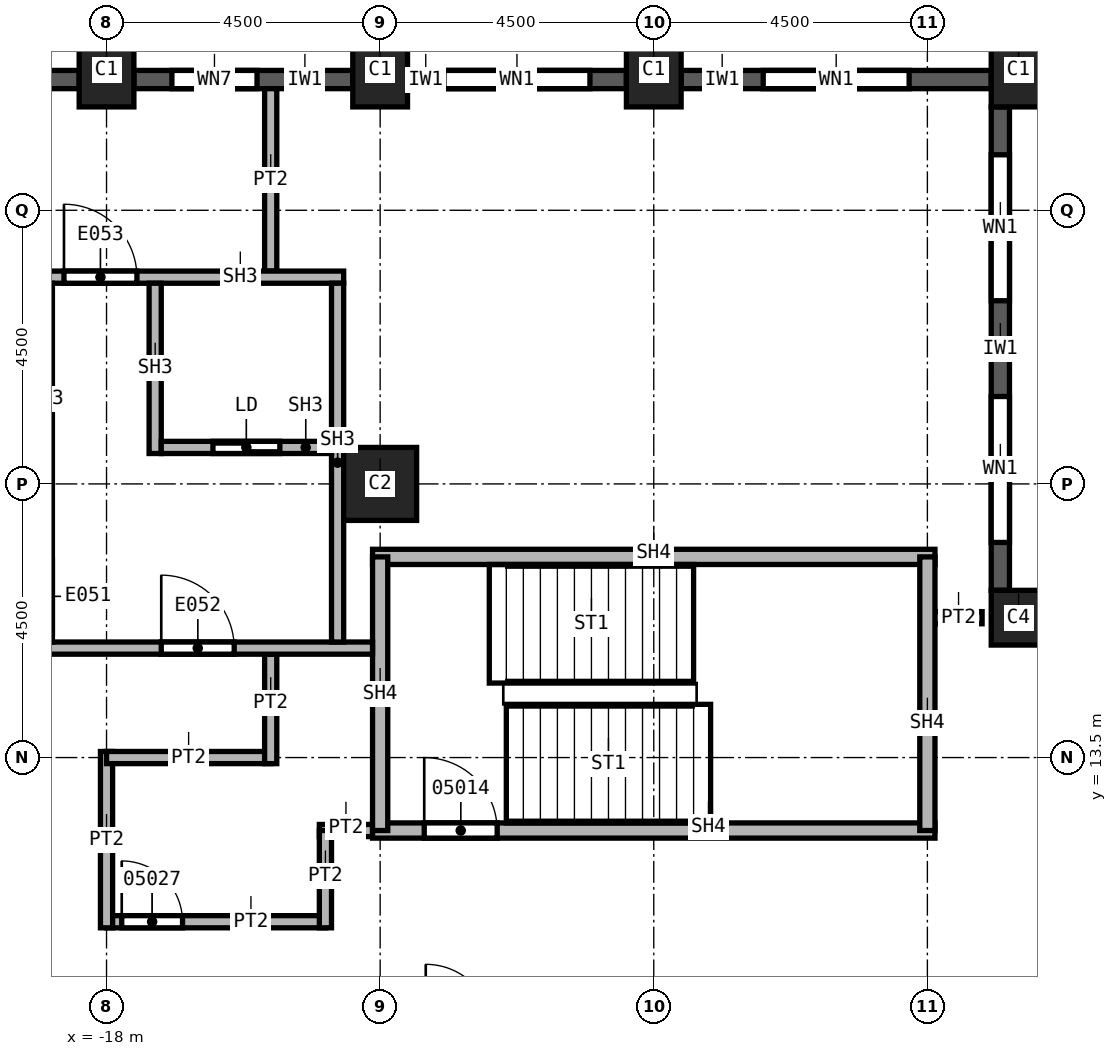
"""IFC4 building model, lengths in metres.
Left out: names, types, materials, properties, quantities, classifications, styles, units other than length and angle.
Written with IfcOpenShell. Run it as: python <this file> out.ifc"""

import sys

from ifc_helpers import new_model, si_unit, direction, frame, frame_2d, origin, origin_2d, place, context, subcontext, project, spatial, rectangle, extrude, element, fill, save


model = new_model("IFC4")
c1 = context("Model", 3, precision=1e-05, world=origin(), true_north=direction((0.0, 1.0)))
c2 = subcontext(c1, "Body", "Model", "MODEL_VIEW")
j1 = project(units=[si_unit("LENGTHUNIT", "METRE"), si_unit("PLANEANGLEUNIT", "RADIAN")], contexts=[c1])
p1 = place(None, origin())
s1 = spatial("IfcSite", under=j1, at=p1, CompositionType="ELEMENT")
p2 = place(p1, origin())
s2 = spatial("IfcBuilding", under=s1, at=p2, CompositionType="ELEMENT")
p3 = place(p2, frame((0.0, 0.0, 116.0)))
s3 = spatial("IfcBuildingStorey", under=s2, at=p3, CompositionType="ELEMENT", Elevation=116.0)
p4 = place(p3, frame((-13.5, 18.0, 0.0), z_axis=(0.0, 0.0, 1.0), x_axis=(1.0, 0.0, 0.0)))
e1 = element("IfcColumn", 1, at=p4, inside=s3, PredefinedType="COLUMN", context=c2, shape_type="SweptSolid", body=[
    extrude(rectangle(XDim=1.2, YDim=1.2, at=origin_2d()), origin(), (0.0, 0.0, 1.0), 3.6),
])
for number, where, z_axis, x_axis in (
    (2, (-3.0, 24.8, 0.0), (0.0, 0.0, 1.0), (1.0, 0.0, 0.0)),
    (3, (-9.0, 24.8, 0.0), (0.0, 0.0, 1.0), (1.0, 0.0, 0.0)),
    (4, (-13.5, 24.8, 0.0), (0.0, 0.0, 1.0), (1.0, 0.0, 0.0)),
    (5, (-18.0, 24.8, 0.0), (0.0, 0.0, 1.0), (1.0, 0.0, 0.0)),
):
    element("IfcColumn", number, at=place(p3, frame(where, z_axis=z_axis, x_axis=x_axis)), inside=s3, PredefinedType="COLUMN", context=c2, shape_type="SweptSolid", body=[
        extrude(rectangle(XDim=0.9, YDim=1.2, at=origin_2d()), origin(), (0.0, 0.0, 1.0), 3.6),
    ])
p5 = place(p3, frame((-3.0, 15.8, 0.0), z_axis=(0.0, 0.0, 1.0), x_axis=(1.0, 0.0, 0.0)))
e6 = element("IfcColumn", 6, at=p5, inside=s3, PredefinedType="COLUMN", context=c2, shape_type="SweptSolid", body=[
    extrude(rectangle(XDim=0.9, YDim=0.9, at=origin_2d()), origin(), (0.0, 0.0, 1.0), 3.6),
])
p6 = place(p3, frame((-3.3, 16.25, 0.0), z_axis=(0.0, 0.0, 1.0), x_axis=(0.0, 1.0, 0.0)))
e7 = element("IfcWall", 7, at=p6, inside=s3, PredefinedType="SOLIDWALL", context=c2, shape_type="SweptSolid", body=[
    extrude(rectangle(XDim=7.95, YDim=0.3, at=frame_2d((3.975, 0.0))), origin(), (0.0, 0.0, 1.0), 3.0),
])
p7 = place(p6, frame((0.788, 0.0, 0.8)))
e8 = element("IfcOpeningElement", 8, at=p7, cuts=e7, PredefinedType="OPENING", context=c2, shape_type="SweptSolid", body=[
    extrude(rectangle(XDim=2.4, YDim=1.95, at=frame_2d((1.2, 0.975))), frame((0.0, 0.15, 0.0), z_axis=(0.0, -1.0, 0.0), x_axis=(1.0, 0.0, 0.0)), (0.0, 0.0, 1.0), 0.3),
])
p8 = place(p6, frame((4.762, 0.0, 0.8)))
e9 = element("IfcOpeningElement", 9, at=p8, cuts=e7, PredefinedType="OPENING", context=c2, shape_type="SweptSolid", body=[
    extrude(rectangle(XDim=2.4, YDim=1.95, at=frame_2d((1.2, 0.975))), frame((0.0, 0.15, 0.0), z_axis=(0.0, -1.0, 0.0), x_axis=(1.0, 0.0, 0.0)), (0.0, 0.0, 1.0), 0.3),
])
p9 = place(p3, frame((-3.45, 24.65, 0.0), z_axis=(0.0, 0.0, 1.0), x_axis=(-1.0, 0.0, 0.0)))
e10 = element("IfcWall", 10, at=p9, inside=s3, PredefinedType="SOLIDWALL", context=c2, shape_type="SweptSolid", body=[
    extrude(rectangle(XDim=5.1, YDim=0.3, at=frame_2d((2.55, 0.0))), origin(), (0.0, 0.0, 1.0), 3.0),
])
p10 = place(p9, frame((1.35, 0.0, 0.8)))
e11 = element("IfcOpeningElement", 11, at=p10, cuts=e10, PredefinedType="OPENING", context=c2, shape_type="SweptSolid", body=[
    extrude(rectangle(XDim=2.4, YDim=1.95, at=frame_2d((1.2, 0.975))), frame((0.0, 0.15, 0.0), z_axis=(0.0, -1.0, 0.0), x_axis=(1.0, 0.0, 0.0)), (0.0, 0.0, 1.0), 0.3),
])
p11 = place(p3, frame((-9.45, 24.65, 0.0), z_axis=(0.0, 0.0, 1.0), x_axis=(-1.0, 0.0, 0.0)))
e12 = element("IfcWall", 12, at=p11, inside=s3, PredefinedType="SOLIDWALL", context=c2, shape_type="SweptSolid", body=[
    extrude(rectangle(XDim=3.6, YDim=0.3, at=frame_2d((1.8, 0.0))), origin(), (0.0, 0.0, 1.0), 3.0),
])
p12 = place(p11, frame((0.6, 0.0, 0.8)))
e13 = element("IfcOpeningElement", 13, at=p12, cuts=e12, PredefinedType="OPENING", context=c2, shape_type="SweptSolid", body=[
    extrude(rectangle(XDim=2.4, YDim=1.95, at=frame_2d((1.2, 0.975))), frame((0.0, 0.15, 0.0), z_axis=(0.0, -1.0, 0.0), x_axis=(1.0, 0.0, 0.0)), (0.0, 0.0, 1.0), 0.3),
])
p13 = place(p3, frame((-13.95, 24.65, 0.0), z_axis=(0.0, 0.0, 1.0), x_axis=(-1.0, 0.0, 0.0)))
e14 = element("IfcWall", 14, at=p13, inside=s3, PredefinedType="SOLIDWALL", context=c2, shape_type="SweptSolid", body=[
    extrude(rectangle(XDim=3.6, YDim=0.3, at=frame_2d((1.8, 0.0))), origin(), (0.0, 0.0, 1.0), 3.0),
])
p14 = place(p13, frame((1.575, 0.0, 0.8)))
e15 = element("IfcOpeningElement", 15, at=p14, cuts=e14, PredefinedType="OPENING", context=c2, shape_type="SweptSolid", body=[
    extrude(rectangle(XDim=1.4, YDim=1.95, at=frame_2d((0.7, 0.975))), frame((0.0, 0.15, 0.0), z_axis=(0.0, -1.0, 0.0), x_axis=(1.0, 0.0, 0.0)), (0.0, 0.0, 1.0), 0.3),
])
p15 = place(p3, frame((-18.45, 24.65, 0.0), z_axis=(0.0, 0.0, 1.0), x_axis=(-1.0, 0.0, 0.0)))
e16 = element("IfcWall", 16, at=p15, inside=s3, PredefinedType="SOLIDWALL", context=c2, shape_type="SweptSolid", body=[
    extrude(rectangle(XDim=3.6, YDim=0.3, at=frame_2d((1.8, 0.0))), origin(), (0.0, 0.0, 1.0), 3.0),
])
p16 = place(p15, frame((0.6, 0.0, 0.8)))
e17 = element("IfcOpeningElement", 17, at=p16, cuts=e16, PredefinedType="OPENING", context=c2, shape_type="SweptSolid", body=[
    extrude(rectangle(XDim=2.4, YDim=1.95, at=frame_2d((1.2, 0.975))), frame((0.0, 0.15, 0.0), z_axis=(0.0, -1.0, 0.0), x_axis=(1.0, 0.0, 0.0)), (0.0, 0.0, 1.0), 0.3),
])
p17 = place(p3, frame((-18.0, 10.8, 0.0), z_axis=(0.0, 0.0, 1.0), x_axis=(1.0, 0.0, 0.0)))
e18 = element("IfcWall", 18, at=p17, inside=s3, PredefinedType="PARTITIONING", context=c2, shape_type="SweptSolid", body=[
    extrude(rectangle(XDim=3.6, YDim=0.2, at=frame_2d((1.8, 0.0))), origin(), (0.0, 0.0, 1.0), 3.6),
])
p18 = place(p17, frame((0.25, 0.0, 0.0)))
e19 = element("IfcOpeningElement", 19, at=p18, cuts=e18, PredefinedType="OPENING", context=c2, shape_type="SweptSolid", body=[
    extrude(rectangle(XDim=1.0, YDim=2.1, at=frame_2d((0.5, 1.05))), frame((0.0, 0.1, 0.0), z_axis=(0.0, -1.0, 0.0), x_axis=(1.0, 0.0, 0.0)), (0.0, 0.0, 1.0), 0.2),
])
p19 = place(p3, frame((-18.0, 13.6, 0.0), z_axis=(0.0, 0.0, 1.0), x_axis=(0.0, -1.0, 0.0)))
e20 = element("IfcWall", 20, at=p19, inside=s3, PredefinedType="PARTITIONING", context=c2, shape_type="SweptSolid", body=[
    extrude(rectangle(XDim=2.9, YDim=0.2, at=frame_2d((1.45, 0.0))), origin(), (0.0, 0.0, 1.0), 3.6),
])
p20 = place(p3, frame((-15.3, 13.5, 0.0), z_axis=(0.0, 0.0, 1.0), x_axis=(-1.0, 0.0, 0.0)))
e21 = element("IfcWall", 21, at=p20, inside=s3, PredefinedType="PARTITIONING", context=c2, shape_type="SweptSolid", body=[
    extrude(rectangle(XDim=2.7, YDim=0.2, at=frame_2d((1.35, 0.0))), origin(), (0.0, 0.0, 1.0), 3.6),
])
p21 = place(p3, frame((-15.3, 15.2, 0.0), z_axis=(0.0, 0.0, 1.0), x_axis=(0.0, -1.0, 0.0)))
e22 = element("IfcWall", 22, at=p21, inside=s3, PredefinedType="PARTITIONING", context=c2, shape_type="SweptSolid", body=[
    extrude(rectangle(XDim=1.8, YDim=0.2, at=frame_2d((0.9, 0.0))), origin(), (0.0, 0.0, 1.0), 3.6),
])
p22 = place(p3, frame((-15.3, 24.5, 0.0), z_axis=(0.0, 0.0, 1.0), x_axis=(0.0, -1.0, 0.0)))
e23 = element("IfcWall", 23, at=p22, inside=s3, PredefinedType="PARTITIONING", context=c2, shape_type="SweptSolid", body=[
    extrude(rectangle(XDim=3.0, YDim=0.2, at=frame_2d((1.5, 0.0))), origin(), (0.0, 0.0, 1.0), 3.6),
])
p23 = place(p3, frame((-14.5, 12.3, 0.0), z_axis=(0.0, 0.0, 1.0), x_axis=(1.0, 0.0, 0.0)))
e24 = element("IfcWall", 24, at=p23, inside=s3, PredefinedType="PARTITIONING", context=c2, shape_type="SweptSolid", body=[
    extrude(rectangle(XDim=1.125, YDim=0.2, at=frame_2d((0.562, 0.0))), origin(), (0.0, 0.0, 1.0), 3.6),
])
p24 = place(p3, frame((-14.4, 10.7, 0.0), z_axis=(0.0, 0.0, 1.0), x_axis=(0.0, 1.0, 0.0)))
e25 = element("IfcWall", 25, at=p24, inside=s3, PredefinedType="PARTITIONING", context=c2, shape_type="SweptSolid", body=[
    extrude(rectangle(XDim=1.6, YDim=0.2, at=frame_2d((0.8, 0.0))), origin(), (0.0, 0.0, 1.0), 3.6),
])
p25 = place(p3, frame((-4.5, 15.8, 0.0), z_axis=(0.0, 0.0, 1.0), x_axis=(1.0, 0.0, 0.0)))
e26 = element("IfcWall", 26, at=p25, inside=s3, PredefinedType="PARTITIONING", context=c2, shape_type="SweptSolid", body=[
    extrude(rectangle(XDim=0.9, YDim=0.2, at=frame_2d((0.45, 0.0))), origin(), (0.0, 0.0, 1.0), 3.6),
])
p26 = place(p3, frame((-13.625, 12.3, 0.0), z_axis=(0.0, 0.0, 1.0), x_axis=(1.0, 0.0, 0.0)))
e27 = element("IfcWall", 27, at=p26, inside=s3, PredefinedType="SOLIDWALL", context=c2, shape_type="SweptSolid", body=[
    extrude(rectangle(XDim=9.25, YDim=0.25, at=frame_2d((4.625, 0.0))), origin(), (0.0, 0.0, 1.0), 3.6),
])
p27 = place(p26, frame((0.85, 0.0, 0.0)))
e28 = element("IfcOpeningElement", 28, at=p27, cuts=e27, PredefinedType="OPENING", context=c2, shape_type="SweptSolid", body=[
    extrude(rectangle(XDim=1.2, YDim=2.1, at=frame_2d((0.6, 1.05))), frame((0.0, 0.125, 0.0), z_axis=(0.0, -1.0, 0.0), x_axis=(1.0, 0.0, 0.0)), (0.0, 0.0, 1.0), 0.25),
])
p28 = place(p3, frame((-13.625, 16.8, 0.0), z_axis=(0.0, 0.0, 1.0), x_axis=(1.0, 0.0, 0.0)))
e29 = element("IfcWall", 29, at=p28, inside=s3, PredefinedType="SOLIDWALL", context=c2, shape_type="SweptSolid", body=[
    extrude(rectangle(XDim=9.25, YDim=0.25, at=frame_2d((4.625, 0.0))), origin(), (0.0, 0.0, 1.0), 3.6),
])
for number, where, z_axis, x_axis in (
    (30, (-13.5, 12.3, 0.0), (0.0, 0.0, 1.0), (0.0, 1.0, 0.0)),
    (31, (-4.5, 16.8, 0.0), (0.0, 0.0, 1.0), (0.0, -1.0, 0.0)),
):
    element("IfcWall", number, at=place(p3, frame(where, z_axis=z_axis, x_axis=x_axis)), inside=s3, PredefinedType="SOLIDWALL", context=c2, shape_type="SweptSolid", body=[
        extrude(rectangle(XDim=4.5, YDim=0.25, at=frame_2d((2.25, 0.0))), origin(), (0.0, 0.0, 1.0), 3.6),
    ])
p29 = place(p3, frame((-21.9, 15.3, 0.0), z_axis=(0.0, 0.0, 1.0), x_axis=(1.0, 0.0, 0.0)))
e32 = element("IfcWall", 32, at=p29, inside=s3, PredefinedType="SOLIDWALL", context=c2, shape_type="SweptSolid", body=[
    extrude(rectangle(XDim=8.275, YDim=0.2, at=frame_2d((4.137, 0.0))), origin(), (0.0, 0.0, 1.0), 3.6),
])
p30 = place(p29, frame((4.8, 0.0, 0.0)))
e33 = element("IfcOpeningElement", 33, at=p30, cuts=e32, PredefinedType="OPENING", context=c2, shape_type="SweptSolid", body=[
    extrude(rectangle(XDim=1.2, YDim=2.1, at=frame_2d((0.6, 1.05))), frame((0.0, 0.1, 0.0), z_axis=(0.0, -1.0, 0.0), x_axis=(1.0, 0.0, 0.0)), (0.0, 0.0, 1.0), 0.2),
])
p31 = place(p3, frame((-21.9, 21.4, 0.0), z_axis=(0.0, 0.0, 1.0), x_axis=(1.0, 0.0, 0.0)))
e34 = element("IfcWall", 34, at=p31, inside=s3, PredefinedType="SOLIDWALL", context=c2, shape_type="SweptSolid", body=[
    extrude(rectangle(XDim=7.8, YDim=0.2, at=frame_2d((3.9, 0.0))), origin(), (0.0, 0.0, 1.0), 3.6),
])
p32 = place(p31, frame((3.2, 0.0, 0.0)))
e35 = element("IfcOpeningElement", 35, at=p32, cuts=e34, PredefinedType="OPENING", context=c2, shape_type="SweptSolid", body=[
    extrude(rectangle(XDim=1.2, YDim=2.1, at=frame_2d((0.6, 1.05))), frame((0.0, 0.1, 0.0), z_axis=(0.0, -1.0, 0.0), x_axis=(1.0, 0.0, 0.0)), (0.0, 0.0, 1.0), 0.2),
])
p33 = place(p3, frame((-14.2, 15.4, 0.0), z_axis=(0.0, 0.0, 1.0), x_axis=(0.0, 1.0, 0.0)))
e36 = element("IfcWall", 36, at=p33, inside=s3, PredefinedType="SOLIDWALL", context=c2, shape_type="SweptSolid", body=[
    extrude(rectangle(XDim=5.9, YDim=0.2, at=frame_2d((2.95, 0.0))), origin(), (0.0, 0.0, 1.0), 3.6),
])
p34 = place(p3, frame((-18.99, 15.4, 0.0), z_axis=(0.0, 0.0, 1.0), x_axis=(0.0, 1.0, 0.0)))
e37 = element("IfcWall", 37, at=p34, inside=s3, PredefinedType="SOLIDWALL", context=c2, shape_type="SweptSolid", body=[
    extrude(rectangle(XDim=5.9, YDim=0.2, at=frame_2d((2.95, 0.0))), origin(), (0.0, 0.0, 1.0), 3.6),
])
p35 = place(p34, frame((0.15, 0.0, 0.0)))
e38 = element("IfcOpeningElement", 38, at=p35, cuts=e37, PredefinedType="OPENING", context=c2, shape_type="SweptSolid", body=[
    extrude(rectangle(XDim=1.2, YDim=2.1, at=frame_2d((0.6, 1.05))), frame((0.0, 0.1, 0.0), z_axis=(0.0, -1.0, 0.0), x_axis=(1.0, 0.0, 0.0)), (0.0, 0.0, 1.0), 0.2),
])
p36 = place(p3, frame((-17.2, 18.5, 0.0), z_axis=(0.0, 0.0, 1.0), x_axis=(0.0, 1.0, 0.0)))
e39 = element("IfcWall", 39, at=p36, inside=s3, PredefinedType="SOLIDWALL", context=c2, shape_type="SweptSolid", body=[
    extrude(rectangle(XDim=2.8, YDim=0.2, at=frame_2d((1.4, 0.0))), origin(), (0.0, 0.0, 1.0), 3.6),
])
p37 = place(p3, frame((-17.1, 18.6, 0.0), z_axis=(0.0, 0.0, 1.0), x_axis=(1.0, 0.0, 0.0)))
e40 = element("IfcWall", 40, at=p37, inside=s3, PredefinedType="SOLIDWALL", context=c2, shape_type="SweptSolid", body=[
    extrude(rectangle(XDim=2.8, YDim=0.2, at=frame_2d((1.4, 0.0))), origin(), (0.0, 0.0, 1.0), 3.6),
])
p38 = place(p37, frame((0.85, 0.0, 0.0)))
e41 = element("IfcOpeningElement", 41, at=p38, cuts=e40, PredefinedType="OPENING", context=c2, shape_type="SweptSolid", body=[
    extrude(rectangle(XDim=1.1, YDim=2.1, at=frame_2d((0.55, 1.05))), frame((0.0, 0.1, 0.0), z_axis=(0.0, -1.0, 0.0), x_axis=(1.0, 0.0, 0.0)), (0.0, 0.0, 1.0), 0.2),
])
p39 = place(p7, origin())
e42 = element("IfcWindow", 42, at=p39, inside=s3, PartitioningType="SINGLE_PANEL", PredefinedType="WINDOW", context=c2, shape_type="SweptSolid", body=[
    extrude(rectangle(XDim=2.4, YDim=1.95, at=frame_2d((1.2, 0.975))), frame((0.0, 0.03, 0.0), z_axis=(0.0, -1.0, 0.0), x_axis=(1.0, 0.0, 0.0)), (0.0, 0.0, 1.0), 0.06),
])
fill(e8, e42)
p40 = place(p8, origin())
e43 = element("IfcWindow", 43, at=p40, inside=s3, PartitioningType="SINGLE_PANEL", PredefinedType="WINDOW", context=c2, shape_type="SweptSolid", body=[
    extrude(rectangle(XDim=2.4, YDim=1.95, at=frame_2d((1.2, 0.975))), frame((0.0, 0.03, 0.0), z_axis=(0.0, -1.0, 0.0), x_axis=(1.0, 0.0, 0.0)), (0.0, 0.0, 1.0), 0.06),
])
fill(e9, e43)
p41 = place(p10, origin())
e44 = element("IfcWindow", 44, at=p41, inside=s3, PartitioningType="SINGLE_PANEL", PredefinedType="WINDOW", context=c2, shape_type="SweptSolid", body=[
    extrude(rectangle(XDim=2.4, YDim=1.95, at=frame_2d((1.2, 0.975))), frame((0.0, 0.03, 0.0), z_axis=(0.0, -1.0, 0.0), x_axis=(1.0, 0.0, 0.0)), (0.0, 0.0, 1.0), 0.06),
])
fill(e11, e44)
p42 = place(p12, origin())
e45 = element("IfcWindow", 45, at=p42, inside=s3, PartitioningType="SINGLE_PANEL", PredefinedType="WINDOW", context=c2, shape_type="SweptSolid", body=[
    extrude(rectangle(XDim=2.4, YDim=1.95, at=frame_2d((1.2, 0.975))), frame((0.0, 0.03, 0.0), z_axis=(0.0, -1.0, 0.0), x_axis=(1.0, 0.0, 0.0)), (0.0, 0.0, 1.0), 0.06),
])
fill(e13, e45)
p43 = place(p27, origin())
e46 = element("IfcDoor", 46, at=p43, inside=s3, OperationType="SINGLE_SWING_LEFT", PredefinedType="DOOR", context=c2, shape_type="SweptSolid", body=[
    extrude(rectangle(XDim=1.2, YDim=2.1, at=frame_2d((0.6, 1.05))), frame((0.0, 0.025, 0.0), z_axis=(0.0, -1.0, 0.0), x_axis=(1.0, 0.0, 0.0)), (0.0, 0.0, 1.0), 0.05),
])
fill(e28, e46)
p44 = place(p18, origin())
e47 = element("IfcDoor", 47, at=p44, inside=s3, OperationType="SINGLE_SWING_RIGHT", PredefinedType="DOOR", context=c2, shape_type="SweptSolid", body=[
    extrude(rectangle(XDim=1.0, YDim=2.1, at=frame_2d((0.5, 1.05))), frame((0.0, 0.025, 0.0), z_axis=(0.0, -1.0, 0.0), x_axis=(1.0, 0.0, 0.0)), (0.0, 0.0, 1.0), 0.05),
])
fill(e19, e47)
p45 = place(p38, origin())
e48 = element("IfcDoor", 48, at=p45, inside=s3, OperationType="SLIDING_TO_LEFT", PredefinedType="DOOR", context=c2, shape_type="SweptSolid", body=[
    extrude(rectangle(XDim=1.1, YDim=2.1, at=frame_2d((0.55, 1.05))), frame((0.0, 0.025, 0.0), z_axis=(0.0, -1.0, 0.0), x_axis=(1.0, 0.0, 0.0)), (0.0, 0.0, 1.0), 0.05),
])
fill(e41, e48)
p46 = place(p30, origin())
e49 = element("IfcDoor", 49, at=p46, inside=s3, OperationType="SINGLE_SWING_RIGHT", PredefinedType="DOOR", context=c2, shape_type="SweptSolid", body=[
    extrude(rectangle(XDim=1.2, YDim=2.1, at=frame_2d((0.6, 1.05))), frame((0.0, 0.025, 0.0), z_axis=(0.0, -1.0, 0.0), x_axis=(1.0, 0.0, 0.0)), (0.0, 0.0, 1.0), 0.05),
])
fill(e33, e49)
p47 = place(p32, origin())
e50 = element("IfcDoor", 50, at=p47, inside=s3, OperationType="SINGLE_SWING_LEFT", PredefinedType="DOOR", context=c2, shape_type="SweptSolid", body=[
    extrude(rectangle(XDim=1.2, YDim=2.1, at=frame_2d((0.6, 1.05))), frame((0.0, 0.025, 0.0), z_axis=(0.0, -1.0, 0.0), x_axis=(1.0, 0.0, 0.0)), (0.0, 0.0, 1.0), 0.05),
])
fill(e35, e50)
p48 = place(p14, origin())
e51 = element("IfcWindow", 51, at=p48, inside=s3, PartitioningType="SINGLE_PANEL", PredefinedType="WINDOW", context=c2, shape_type="SweptSolid", body=[
    extrude(rectangle(XDim=1.4, YDim=1.95, at=frame_2d((0.7, 0.975))), frame((0.0, 0.03, 0.0), z_axis=(0.0, -1.0, 0.0), x_axis=(1.0, 0.0, 0.0)), (0.0, 0.0, 1.0), 0.06),
])
fill(e15, e51)
save(model, sys.argv[1])
